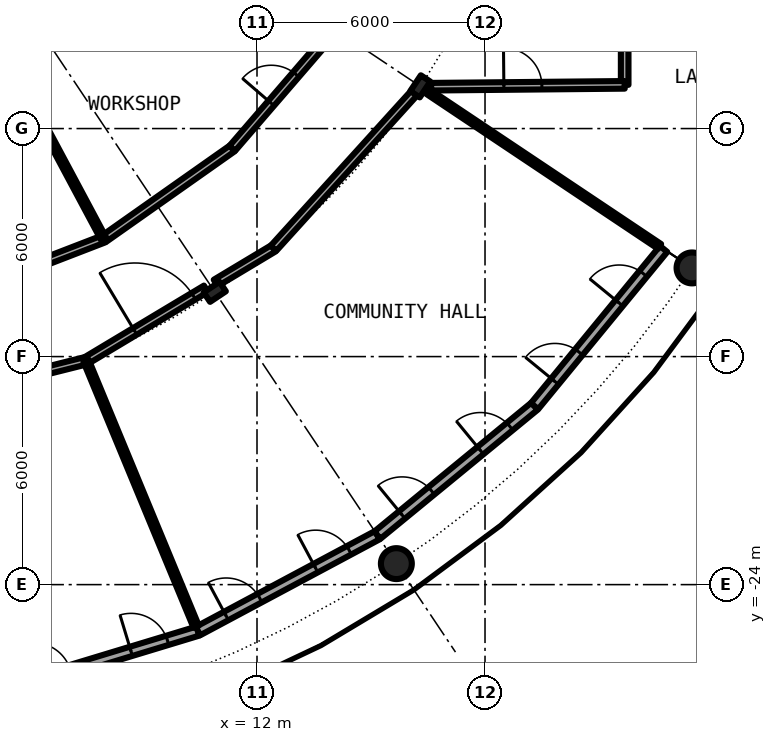
"""IFC4 building model, lengths in metres.
Left out: names, types, materials, properties, quantities, classifications, styles, units other than length and angle.
Written with IfcOpenShell. Run it as: python <this file> out.ifc"""

import sys

from ifc_helpers import new_model, si_unit, direction, frame, frame_2d, origin, origin_2d, place, context, subcontext, project, spatial, rectangle, hollow_circle, i_section, extrude, element, fill, save


model = new_model("IFC4")
c1 = context("Model", 3, precision=1e-05, world=origin(), true_north=direction((0.0, 1.0)))
c2 = subcontext(c1, "Body", "Model", "MODEL_VIEW")
j1 = project(units=[si_unit("LENGTHUNIT", "METRE"), si_unit("PLANEANGLEUNIT", "RADIAN")], contexts=[c1])
p1 = place(None, origin())
s1 = spatial("IfcSite", under=j1, at=p1, CompositionType="ELEMENT")
p2 = place(p1, origin())
s2 = spatial("IfcBuilding", under=s1, at=p2, CompositionType="ELEMENT")
p3 = place(p2, frame((0.0, 0.0, 157.4)))
s3 = spatial("IfcBuildingStorey", under=s2, at=p3, CompositionType="ELEMENT", Elevation=157.4)
for number, where, z_axis, x_axis in (
    (1, (15.667, -23.448, 0.0), (0.0, 0.0, 1.0), (1.0, 0.0, 0.0)),
    (2, (23.448, -15.667, 0.0), (0.0, 0.0, 1.0), (1.0, 0.0, 0.0)),
):
    element("IfcColumn", number, at=place(p3, frame(where, z_axis=z_axis, x_axis=x_axis)), inside=s3, PredefinedType="COLUMN", context=c2, shape_type="SweptSolid", body=[
        extrude(hollow_circle(Radius=0.406, WallThickness=0.04, at=origin_2d()), origin(), (0.0, 0.0, 1.0), 4.2),
    ])
for number, where, z_axis, x_axis in (
    (3, (10.889, -16.297, 0.0), (0.0, 0.0, 1.0), (0.556, -0.831, 0.0)),
    (4, (16.297, -10.889, 0.0), (0.0, 0.0, 1.0), (0.831, -0.556, 0.0)),
):
    element("IfcColumn", number, at=place(p3, frame(where, z_axis=z_axis, x_axis=x_axis)), inside=s3, PredefinedType="COLUMN", context=c2, shape_type="SweptSolid", body=[
        extrude(i_section(OverallWidth=0.3, OverallDepth=0.5, WebThickness=0.014, FlangeThickness=0.028, FilletRadius=0.027, at=origin_2d()), origin(), (0.0, 0.0, 1.0), 4.2),
    ])
p4 = place(p3, frame((5.326, -26.775, 0.0), z_axis=(0.0, 0.0, 1.0), x_axis=(0.956965678721, 0.290201119486, 0.0)))
e5 = element("IfcWall", 5, at=p4, inside=s3, PredefinedType="SOLIDWALL", context=c2, shape_type="SweptSolid", body=[
    extrude(rectangle(XDim=5.351, YDim=0.25, at=frame_2d((2.676, 0.0))), origin(), (0.0, 0.0, 1.0), 3.85),
])
p5 = place(p4, frame((0.841, 0.0, 0.0)))
e6 = element("IfcOpeningElement", 6, at=p5, cuts=e5, PredefinedType="OPENING", context=c2, shape_type="SweptSolid", body=[
    extrude(rectangle(XDim=1.0, YDim=2.2, at=frame_2d((0.5, 1.1))), frame((0.0, 0.135, 0.0), z_axis=(0.0, -1.0, 0.0), x_axis=(1.0, 0.0, 0.0)), (0.0, 0.0, 1.0), 0.27),
])
p6 = place(p4, frame((3.51, 0.0, 0.0)))
e7 = element("IfcOpeningElement", 7, at=p6, cuts=e5, PredefinedType="OPENING", context=c2, shape_type="SweptSolid", body=[
    extrude(rectangle(XDim=1.0, YDim=2.2, at=frame_2d((0.5, 1.1))), frame((0.0, 0.135, 0.0), z_axis=(0.0, -1.0, 0.0), x_axis=(1.0, 0.0, 0.0)), (0.0, 0.0, 1.0), 0.27),
])
p7 = place(p3, frame((10.447, -25.222, 0.0), z_axis=(0.0, 0.0, 1.0), x_axis=(0.881915646801, 0.471407246368, 0.0)))
e8 = element("IfcWall", 8, at=p7, inside=s3, PredefinedType="SOLIDWALL", context=c2, shape_type="SweptSolid", body=[
    extrude(rectangle(XDim=5.352, YDim=0.25, at=frame_2d((2.676, 0.0))), origin(), (0.0, 0.0, 1.0), 3.85),
])
p8 = place(p7, frame((0.841, 0.0, 0.0)))
e9 = element("IfcOpeningElement", 9, at=p8, cuts=e8, PredefinedType="OPENING", context=c2, shape_type="SweptSolid", body=[
    extrude(rectangle(XDim=1.0, YDim=2.2, at=frame_2d((0.5, 1.1))), frame((0.0, 0.135, 0.0), z_axis=(0.0, -1.0, 0.0), x_axis=(1.0, 0.0, 0.0)), (0.0, 0.0, 1.0), 0.27),
])
p9 = place(p7, frame((3.51, 0.0, 0.0)))
e10 = element("IfcOpeningElement", 10, at=p9, cuts=e8, PredefinedType="OPENING", context=c2, shape_type="SweptSolid", body=[
    extrude(rectangle(XDim=1.0, YDim=2.2, at=frame_2d((0.5, 1.1))), frame((0.0, 0.135, 0.0), z_axis=(0.0, -1.0, 0.0), x_axis=(1.0, 0.0, 0.0)), (0.0, 0.0, 1.0), 0.27),
])
p10 = place(p3, frame((15.167, -22.699, 0.0), z_axis=(0.0, 0.0, 1.0), x_axis=(0.773019449054, 0.634382322723, 0.0)))
e11 = element("IfcWall", 11, at=p10, inside=s3, PredefinedType="SOLIDWALL", context=c2, shape_type="SweptSolid", body=[
    extrude(rectangle(XDim=5.352, YDim=0.25, at=frame_2d((2.676, 0.0))), origin(), (0.0, 0.0, 1.0), 3.85),
])
p11 = place(p10, frame((0.841, 0.0, 0.0)))
e12 = element("IfcOpeningElement", 12, at=p11, cuts=e11, PredefinedType="OPENING", context=c2, shape_type="SweptSolid", body=[
    extrude(rectangle(XDim=1.0, YDim=2.2, at=frame_2d((0.5, 1.1))), frame((0.0, 0.135, 0.0), z_axis=(0.0, -1.0, 0.0), x_axis=(1.0, 0.0, 0.0)), (0.0, 0.0, 1.0), 0.27),
])
p12 = place(p10, frame((3.51, 0.0, 0.0)))
e13 = element("IfcOpeningElement", 13, at=p12, cuts=e11, PredefinedType="OPENING", context=c2, shape_type="SweptSolid", body=[
    extrude(rectangle(XDim=1.0, YDim=2.2, at=frame_2d((0.5, 1.1))), frame((0.0, 0.135, 0.0), z_axis=(0.0, -1.0, 0.0), x_axis=(1.0, 0.0, 0.0)), (0.0, 0.0, 1.0), 0.27),
])
p13 = place(p3, frame((19.304, -19.304, 0.0), z_axis=(0.0, 0.0, 1.0), x_axis=(0.634382322723, 0.773019449054, 0.0)))
e14 = element("IfcWall", 14, at=p13, inside=s3, PredefinedType="SOLIDWALL", context=c2, shape_type="SweptSolid", body=[
    extrude(rectangle(XDim=5.352, YDim=0.25, at=frame_2d((2.676, 0.0))), origin(), (0.0, 0.0, 1.0), 3.85),
])
p14 = place(p13, frame((0.841, 0.0, 0.0)))
e15 = element("IfcOpeningElement", 15, at=p14, cuts=e14, PredefinedType="OPENING", context=c2, shape_type="SweptSolid", body=[
    extrude(rectangle(XDim=1.0, YDim=2.2, at=frame_2d((0.5, 1.1))), frame((0.0, 0.135, 0.0), z_axis=(0.0, -1.0, 0.0), x_axis=(1.0, 0.0, 0.0)), (0.0, 0.0, 1.0), 0.27),
])
p15 = place(p13, frame((3.51, 0.0, 0.0)))
e16 = element("IfcOpeningElement", 16, at=p15, cuts=e14, PredefinedType="OPENING", context=c2, shape_type="SweptSolid", body=[
    extrude(rectangle(XDim=1.0, YDim=2.2, at=frame_2d((0.5, 1.1))), frame((0.0, 0.135, 0.0), z_axis=(0.0, -1.0, 0.0), x_axis=(1.0, 0.0, 0.0)), (0.0, 0.0, 1.0), 0.27),
])
p16 = place(p3, frame((21.675, -10.85, 0.0), z_axis=(0.0, 0.0, 1.0), x_axis=(0.0, 1.0, 0.0)))
e17 = element("IfcWall", 17, at=p16, inside=s3, PredefinedType="PARTITIONING", context=c2, shape_type="SweptSolid", body=[
    extrude(rectangle(XDim=1.75, YDim=0.2, at=frame_2d((0.875, 0.0))), origin(), (0.0, 0.0, 1.0), 3.85),
])
p17 = place(p3, frame((3.933, -19.002, 0.0), z_axis=(0.0, 0.0, 1.0), x_axis=(0.970009604092, 0.243066591637, 0.0)))
e18 = element("IfcWall", 18, at=p17, inside=s3, PredefinedType="PARTITIONING", context=c2, shape_type="SweptSolid", body=[
    extrude(rectangle(XDim=3.678, YDim=0.2, at=frame_2d((1.839, 0.0))), origin(), (0.0, 0.0, 1.0), 3.54),
])
p18 = place(p17, frame((0.476, 0.0, 0.0)))
e19 = element("IfcOpeningElement", 19, at=p18, cuts=e18, PredefinedType="OPENING", context=c2, shape_type="SweptSolid", body=[
    extrude(rectangle(XDim=1.0, YDim=2.3, at=frame_2d((0.5, 1.15))), frame((0.0, 0.11, 0.0), z_axis=(0.0, -1.0, 0.0), x_axis=(1.0, 0.0, 0.0)), (0.0, 0.0, 1.0), 0.22),
])
p19 = place(p3, frame((7.501, -18.108, 0.0), z_axis=(0.0, 0.0, 1.0), x_axis=(0.857750505244, 0.514066212421, 0.0)))
e20 = element("IfcWall", 20, at=p19, inside=s3, PredefinedType="PARTITIONING", context=c2, shape_type="SweptSolid", body=[
    extrude(rectangle(XDim=3.678, YDim=0.2, at=frame_2d((1.839, 0.0))), origin(), (0.0, 0.0, 1.0), 3.54),
])
p20 = place(p19, frame((1.5, 0.0, 0.0)))
e21 = element("IfcOpeningElement", 21, at=p20, cuts=e20, PredefinedType="OPENING", context=c2, shape_type="SweptSolid", body=[
    extrude(rectangle(XDim=1.8, YDim=2.3, at=frame_2d((0.9, 1.15))), frame((0.0, 0.11, 0.0), z_axis=(0.0, -1.0, 0.0), x_axis=(1.0, 0.0, 0.0)), (0.0, 0.0, 1.0), 0.22),
])
p21 = place(p3, frame((10.913, -16.063, 0.0), z_axis=(0.0, 0.0, 1.0), x_axis=(0.857614365469, 0.514293301668, 0.0)))
e22 = element("IfcWall", 22, at=p21, inside=s3, PredefinedType="PARTITIONING", context=c2, shape_type="SweptSolid", body=[
    extrude(rectangle(XDim=1.773, YDim=0.2, at=frame_2d((0.887, 0.0))), origin(), (0.0, 0.0, 1.0), 3.54),
])
p22 = place(p3, frame((12.434, -15.151, 0.0), z_axis=(0.0, 0.0, 1.0), x_axis=(0.671532887857, 0.740974750262, 0.0)))
e23 = element("IfcWall", 23, at=p22, inside=s3, PredefinedType="PARTITIONING", context=c2, shape_type="SweptSolid", body=[
    extrude(rectangle(XDim=5.601, YDim=0.2, at=frame_2d((2.8, 0.0))), origin(), (0.0, 0.0, 1.0), 3.54),
])
p23 = place(p3, frame((4.106, -16.394, 0.0), z_axis=(0.0, 0.0, 1.0), x_axis=(0.932943640288, 0.360022449363, 0.0)))
e24 = element("IfcWall", 24, at=p23, inside=s3, PredefinedType="PARTITIONING", context=c2, shape_type="SweptSolid", body=[
    extrude(rectangle(XDim=4.139, YDim=0.2, at=frame_2d((2.069, 0.0))), origin(), (0.0, 0.0, 1.0), 3.85),
])
p24 = place(p23, frame((1.569, 0.0, 0.0)))
e25 = element("IfcOpeningElement", 25, at=p24, cuts=e24, PredefinedType="OPENING", context=c2, shape_type="SweptSolid", body=[
    extrude(rectangle(XDim=1.0, YDim=2.3, at=frame_2d((0.5, 1.15))), frame((0.0, 0.11, 0.0), z_axis=(0.0, -1.0, 0.0), x_axis=(1.0, 0.0, 0.0)), (0.0, 0.0, 1.0), 0.22),
])
p25 = place(p3, frame((7.967, -14.904, 0.0), z_axis=(0.0, 0.0, 1.0), x_axis=(0.817567680547, 0.575832517079, 0.0)))
e26 = element("IfcWall", 26, at=p25, inside=s3, PredefinedType="PARTITIONING", context=c2, shape_type="SweptSolid", body=[
    extrude(rectangle(XDim=4.137, YDim=0.2, at=frame_2d((2.068, 0.0))), origin(), (0.0, 0.0, 1.0), 3.85),
])
p26 = place(p3, frame((11.349, -12.522, 0.0), z_axis=(0.0, 0.0, 1.0), x_axis=(0.653273870261, 0.757121687996, 0.0)))
e27 = element("IfcWall", 27, at=p26, inside=s3, PredefinedType="PARTITIONING", context=c2, shape_type="SweptSolid", body=[
    extrude(rectangle(XDim=4.189, YDim=0.2, at=frame_2d((2.095, 0.0))), origin(), (0.0, 0.0, 1.0), 3.85),
])
p27 = place(p26, frame((1.569, 0.0, 0.0)))
e28 = element("IfcOpeningElement", 28, at=p27, cuts=e27, PredefinedType="OPENING", context=c2, shape_type="SweptSolid", body=[
    extrude(rectangle(XDim=1.0, YDim=2.3, at=frame_2d((0.5, 1.15))), frame((0.0, 0.11, 0.0), z_axis=(0.0, -1.0, 0.0), x_axis=(1.0, 0.0, 0.0)), (0.0, 0.0, 1.0), 0.22),
])
p28 = place(p3, frame((16.582, -10.899, 0.0), z_axis=(0.0, 0.0, 1.0), x_axis=(0.999954045313, 0.009586827528, 0.0)))
e29 = element("IfcWall", 29, at=p28, inside=s3, PredefinedType="PARTITIONING", context=c2, shape_type="SweptSolid", body=[
    extrude(rectangle(XDim=5.093, YDim=0.2, at=frame_2d((2.547, 0.0))), origin(), (0.0, 0.0, 1.0), 3.85),
])
p29 = place(p28, frame((1.914, 0.0, 0.0)))
e30 = element("IfcOpeningElement", 30, at=p29, cuts=e29, PredefinedType="OPENING", context=c2, shape_type="SweptSolid", body=[
    extrude(rectangle(XDim=1.0, YDim=2.3, at=frame_2d((0.5, 1.15))), frame((0.0, 0.11, 0.0), z_axis=(0.0, -1.0, 0.0), x_axis=(1.0, 0.0, 0.0)), (0.0, 0.0, 1.0), 0.22),
])
p30 = place(p3, frame((3.639, -6.808, 0.0), z_axis=(0.0, 0.0, 1.0), x_axis=(0.471460365694, -0.881887251059, 0.0)))
e31 = element("IfcWall", 31, at=p30, inside=s3, PredefinedType="PARTITIONING", context=c2, shape_type="SweptSolid", body=[
    extrude(rectangle(XDim=9.18, YDim=0.15, at=frame_2d((4.59, 0.0))), origin(), (0.0, 0.0, 1.0), 3.85),
])
p31 = place(p3, frame((7.501, -18.108, 0.0), z_axis=(0.0, 0.0, 1.0), x_axis=(0.382600411313, -0.923913916587, 0.0)))
e32 = element("IfcWall", 32, at=p31, inside=s3, PredefinedType="PARTITIONING", context=c2, shape_type="SweptSolid", body=[
    extrude(rectangle(XDim=7.574, YDim=0.15, at=frame_2d((3.787, 0.0))), origin(), (0.0, 0.0, 1.0), 3.85),
])
p32 = place(p3, frame((16.503, -11.031, 0.0), z_axis=(0.0, 0.0, 1.0), x_axis=(0.831419048668, -0.555645899393, 0.0)))
e33 = element("IfcWall", 33, at=p32, inside=s3, PredefinedType="PARTITIONING", context=c2, shape_type="SweptSolid", body=[
    extrude(rectangle(XDim=7.325, YDim=0.15, at=frame_2d((3.663, 0.0))), origin(), (0.0, 0.0, 1.0), 3.85),
])
p33 = place(p6, origin())
e34 = element("IfcDoor", 34, at=p33, inside=s3, OperationType="SINGLE_SWING_LEFT", PredefinedType="DOOR", context=c2, shape_type="SweptSolid", body=[
    extrude(rectangle(XDim=1.0, YDim=2.2, at=frame_2d((0.5, 1.1))), frame((0.0, 0.025, 0.0), z_axis=(0.0, -1.0, 0.0), x_axis=(1.0, 0.0, 0.0)), (0.0, 0.0, 1.0), 0.05),
])
fill(e7, e34)
p34 = place(p8, origin())
e35 = element("IfcDoor", 35, at=p34, inside=s3, OperationType="SINGLE_SWING_LEFT", PredefinedType="DOOR", context=c2, shape_type="SweptSolid", body=[
    extrude(rectangle(XDim=1.0, YDim=2.2, at=frame_2d((0.5, 1.1))), frame((0.0, 0.025, 0.0), z_axis=(0.0, -1.0, 0.0), x_axis=(1.0, 0.0, 0.0)), (0.0, 0.0, 1.0), 0.05),
])
fill(e9, e35)
p35 = place(p9, origin())
e36 = element("IfcDoor", 36, at=p35, inside=s3, OperationType="SINGLE_SWING_LEFT", PredefinedType="DOOR", context=c2, shape_type="SweptSolid", body=[
    extrude(rectangle(XDim=1.0, YDim=2.2, at=frame_2d((0.5, 1.1))), frame((0.0, 0.025, 0.0), z_axis=(0.0, -1.0, 0.0), x_axis=(1.0, 0.0, 0.0)), (0.0, 0.0, 1.0), 0.05),
])
fill(e10, e36)
p36 = place(p11, origin())
e37 = element("IfcDoor", 37, at=p36, inside=s3, OperationType="SINGLE_SWING_LEFT", PredefinedType="DOOR", context=c2, shape_type="SweptSolid", body=[
    extrude(rectangle(XDim=1.0, YDim=2.2, at=frame_2d((0.5, 1.1))), frame((0.0, 0.025, 0.0), z_axis=(0.0, -1.0, 0.0), x_axis=(1.0, 0.0, 0.0)), (0.0, 0.0, 1.0), 0.05),
])
fill(e12, e37)
p37 = place(p12, origin())
e38 = element("IfcDoor", 38, at=p37, inside=s3, OperationType="SINGLE_SWING_LEFT", PredefinedType="DOOR", context=c2, shape_type="SweptSolid", body=[
    extrude(rectangle(XDim=1.0, YDim=2.2, at=frame_2d((0.5, 1.1))), frame((0.0, 0.025, 0.0), z_axis=(0.0, -1.0, 0.0), x_axis=(1.0, 0.0, 0.0)), (0.0, 0.0, 1.0), 0.05),
])
fill(e13, e38)
p38 = place(p14, origin())
e39 = element("IfcDoor", 39, at=p38, inside=s3, OperationType="SINGLE_SWING_LEFT", PredefinedType="DOOR", context=c2, shape_type="SweptSolid", body=[
    extrude(rectangle(XDim=1.0, YDim=2.2, at=frame_2d((0.5, 1.1))), frame((0.0, 0.025, 0.0), z_axis=(0.0, -1.0, 0.0), x_axis=(1.0, 0.0, 0.0)), (0.0, 0.0, 1.0), 0.05),
])
fill(e15, e39)
p39 = place(p15, origin())
e40 = element("IfcDoor", 40, at=p39, inside=s3, OperationType="SINGLE_SWING_LEFT", PredefinedType="DOOR", context=c2, shape_type="SweptSolid", body=[
    extrude(rectangle(XDim=1.0, YDim=2.2, at=frame_2d((0.5, 1.1))), frame((0.0, 0.025, 0.0), z_axis=(0.0, -1.0, 0.0), x_axis=(1.0, 0.0, 0.0)), (0.0, 0.0, 1.0), 0.05),
])
fill(e16, e40)
p40 = place(p20, origin())
e41 = element("IfcDoor", 41, at=p40, inside=s3, OperationType="DOUBLE_DOOR_SINGLE_SWING", PredefinedType="DOOR", context=c2, shape_type="SweptSolid", body=[
    extrude(rectangle(XDim=1.8, YDim=2.3, at=frame_2d((0.9, 1.15))), frame((0.0, 0.025, 0.0), z_axis=(0.0, -1.0, 0.0), x_axis=(1.0, 0.0, 0.0)), (0.0, 0.0, 1.0), 0.05),
])
fill(e21, e41)
p41 = place(p27, origin())
e42 = element("IfcDoor", 42, at=p41, inside=s3, OperationType="SINGLE_SWING_RIGHT", PredefinedType="DOOR", context=c2, shape_type="SweptSolid", body=[
    extrude(rectangle(XDim=1.0, YDim=2.3, at=frame_2d((0.5, 1.15))), frame((0.0, 0.025, 0.0), z_axis=(0.0, -1.0, 0.0), x_axis=(1.0, 0.0, 0.0)), (0.0, 0.0, 1.0), 0.05),
])
fill(e28, e42)
p42 = place(p29, origin())
e43 = element("IfcDoor", 43, at=p42, inside=s3, OperationType="SINGLE_SWING_LEFT", PredefinedType="DOOR", context=c2, shape_type="SweptSolid", body=[
    extrude(rectangle(XDim=1.0, YDim=2.3, at=frame_2d((0.5, 1.15))), frame((0.0, 0.025, 0.0), z_axis=(0.0, -1.0, 0.0), x_axis=(1.0, 0.0, 0.0)), (0.0, 0.0, 1.0), 0.05),
])
fill(e30, e43)
save(model, sys.argv[1])
